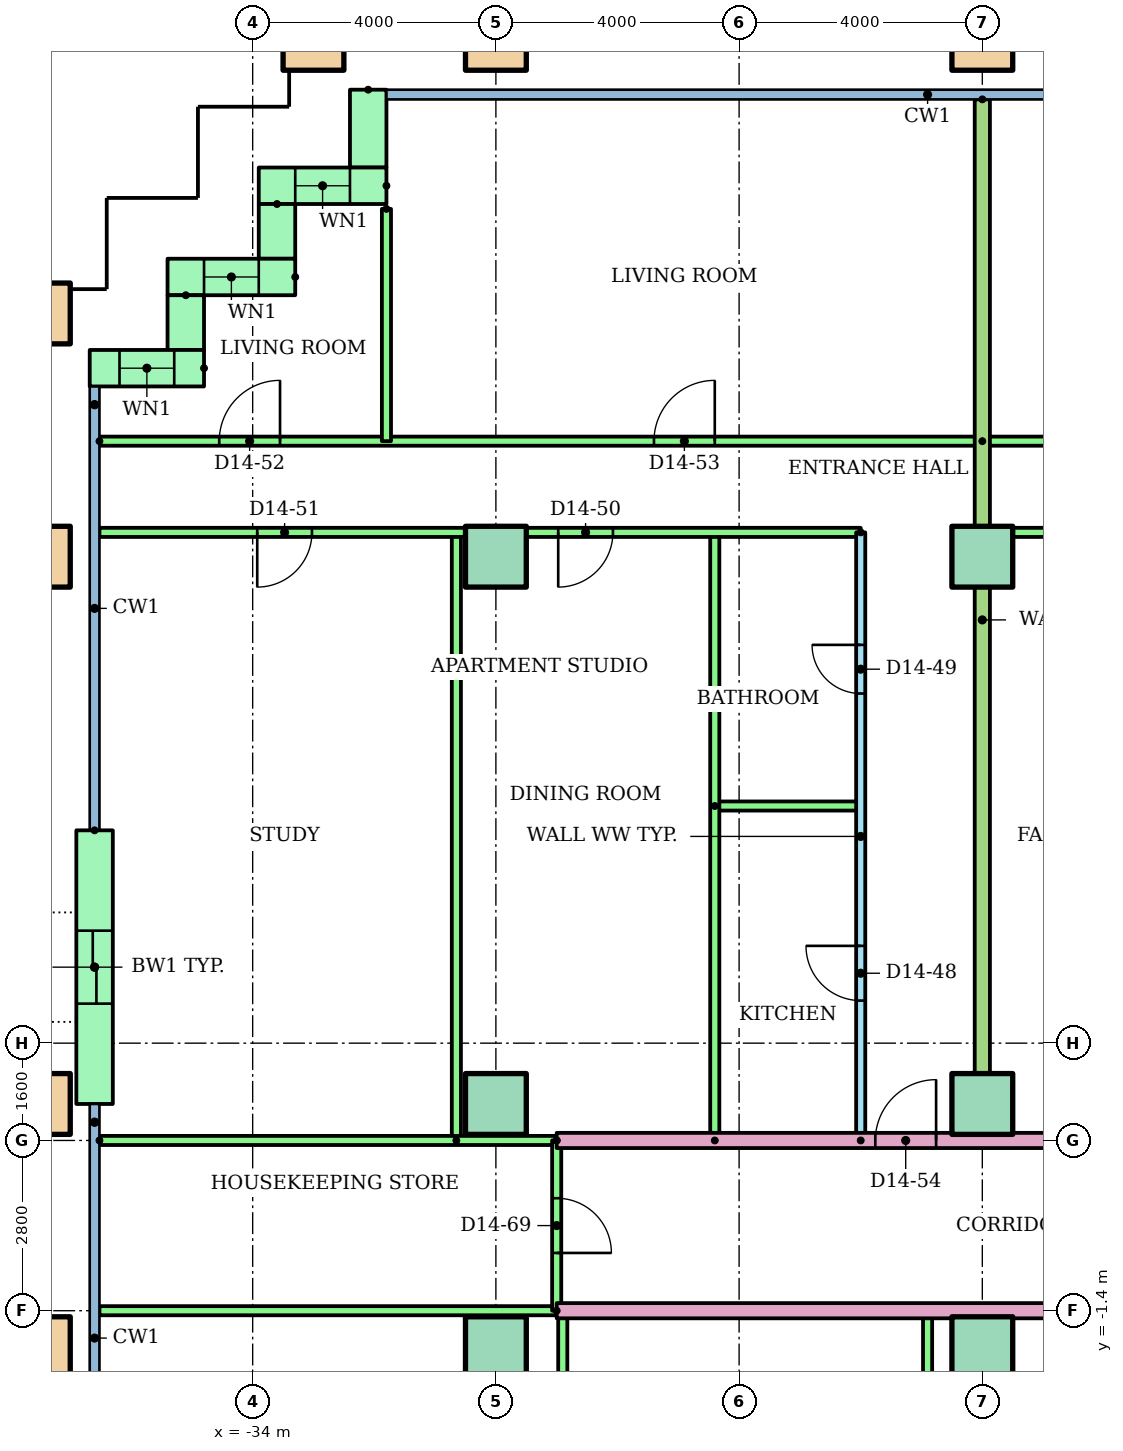
"""IFC4 building model, lengths in metres.
Left out: names, types, materials, properties, quantities, classifications, styles, units other than length and angle.
Written with IfcOpenShell. Run it as: python <this file> out.ifc"""

import sys

from ifc_helpers import new_model, si_unit, direction, frame, frame_2d, origin, origin_2d, place, context, subcontext, project, spatial, rectangle, hollow_rectangle, extrude, element, fill, save


model = new_model("IFC4")
c1 = context("Model", 3, precision=1e-05, world=origin(), true_north=direction((0.0, 1.0)))
c2 = subcontext(c1, "Body", "Model", "MODEL_VIEW")
j1 = project(units=[si_unit("LENGTHUNIT", "METRE"), si_unit("PLANEANGLEUNIT", "RADIAN")], contexts=[c1])
p1 = place(None, origin())
s1 = spatial("IfcSite", under=j1, at=p1, CompositionType="ELEMENT")
p2 = place(p1, origin())
s2 = spatial("IfcBuilding", under=s1, at=p2, CompositionType="ELEMENT")
p3 = place(p2, frame((0.0, 0.0, 54.4)))
s3 = spatial("IfcBuildingStorey", under=s2, at=p3, CompositionType="ELEMENT", Elevation=54.4)
p4 = place(p3, frame((-37.5, -2.0, 0.0)))
e1 = element("IfcColumn", 1, at=p4, inside=s3, PredefinedType="COLUMN", context=c2, shape_type="SweptSolid", body=[
    extrude(hollow_rectangle(XDim=1.0, YDim=1.0, WallThickness=0.05, at=origin_2d()), origin(), (0.0, 0.0, 1.0), 3.2),
])
for number, where in (
    (2, (-30.0, -2.0, 0.0)),
    (3, (-22.0, -2.0, 0.0)),
):
    element("IfcColumn", number, at=place(p3, frame(where)), inside=s3, PredefinedType="COLUMN", context=c2, shape_type="SweptSolid", body=[
        extrude(rectangle(XDim=1.0, YDim=1.0, at=origin_2d()), origin(), (0.0, 0.0, 1.0), 3.2),
    ])
p5 = place(p3, frame((-37.5, 2.0, 0.0)))
e4 = element("IfcColumn", 4, at=p5, inside=s3, PredefinedType="COLUMN", context=c2, shape_type="SweptSolid", body=[
    extrude(hollow_rectangle(XDim=1.0, YDim=1.0, WallThickness=0.05, at=origin_2d()), origin(), (0.0, 0.0, 1.0), 3.2),
])
for number, where in (
    (5, (-30.0, 2.0, 0.0)),
    (6, (-22.0, 2.0, 0.0)),
):
    element("IfcColumn", number, at=place(p3, frame(where)), inside=s3, PredefinedType="COLUMN", context=c2, shape_type="SweptSolid", body=[
        extrude(rectangle(XDim=1.0, YDim=1.0, at=origin_2d()), origin(), (0.0, 0.0, 1.0), 3.2),
    ])
p6 = place(p3, frame((-37.5, 11.0, 0.0)))
e7 = element("IfcColumn", 7, at=p6, inside=s3, PredefinedType="COLUMN", context=c2, shape_type="SweptSolid", body=[
    extrude(hollow_rectangle(XDim=1.0, YDim=1.0, WallThickness=0.05, at=origin_2d()), origin(), (0.0, 0.0, 1.0), 3.2),
])
for number, where in (
    (8, (-30.0, 11.0, 0.0)),
    (9, (-22.0, 11.0, 0.0)),
):
    element("IfcColumn", number, at=place(p3, frame(where)), inside=s3, PredefinedType="COLUMN", context=c2, shape_type="SweptSolid", body=[
        extrude(rectangle(XDim=1.0, YDim=1.0, at=origin_2d()), origin(), (0.0, 0.0, 1.0), 3.2),
    ])
for number, where in (
    (10, (-37.5, 15.0, 0.0)),
    (11, (-33.0, 19.5, 0.0)),
    (12, (-30.0, 19.5, 0.0)),
    (13, (-22.0, 19.5, 0.0)),
):
    element("IfcColumn", number, at=place(p3, frame(where)), inside=s3, PredefinedType="COLUMN", context=c2, shape_type="SweptSolid", body=[
        extrude(hollow_rectangle(XDim=1.0, YDim=1.0, WallThickness=0.05, at=origin_2d()), origin(), (0.0, 0.0, 1.0), 3.2),
    ])
p7 = place(p3, frame((-32.1, 18.68, 0.0), z_axis=(0.0, 0.0, 1.0), x_axis=(0.0, -1.0, 0.0)))
e14 = element("IfcWall", 14, at=p7, inside=s3, PredefinedType="STANDARD", context=c2, shape_type="SweptSolid", body=[
    extrude(rectangle(XDim=1.28, YDim=0.6, at=frame_2d((0.64, 0.0))), origin(), (0.0, 0.0, 1.0), 2.92),
])
p8 = place(p3, frame((-31.8, 17.1, 0.0), z_axis=(0.0, 0.0, 1.0), x_axis=(-1.0, 0.0, 0.0)))
e15 = element("IfcWall", 15, at=p8, inside=s3, PredefinedType="STANDARD", context=c2, shape_type="SweptSolid", body=[
    extrude(rectangle(XDim=2.1, YDim=0.6, at=frame_2d((1.05, 0.0))), origin(), (0.0, 0.0, 1.0), 2.92),
])
p9 = place(p8, frame((0.6, 0.0, 0.9)))
e16 = element("IfcOpeningElement", 16, at=p9, cuts=e15, PredefinedType="OPENING", context=c2, shape_type="SweptSolid", body=[
    extrude(rectangle(XDim=0.9, YDim=1.5, at=frame_2d((0.45, 0.75))), frame((0.0, 0.31, 0.0), z_axis=(0.0, -1.0, 0.0), x_axis=(1.0, 0.0, 0.0)), (0.0, 0.0, 1.0), 0.62),
])
p10 = place(p3, frame((-33.6, 16.8, 0.0), z_axis=(0.0, 0.0, 1.0), x_axis=(0.0, -1.0, 0.0)))
e17 = element("IfcWall", 17, at=p10, inside=s3, PredefinedType="STANDARD", context=c2, shape_type="SweptSolid", body=[
    extrude(rectangle(XDim=0.9, YDim=0.6, at=frame_2d((0.45, 0.0))), origin(), (0.0, 0.0, 1.0), 2.92),
])
p11 = place(p3, frame((-33.3, 15.6, 0.0), z_axis=(0.0, 0.0, 1.0), x_axis=(-1.0, 0.0, 0.0)))
e18 = element("IfcWall", 18, at=p11, inside=s3, PredefinedType="STANDARD", context=c2, shape_type="SweptSolid", body=[
    extrude(rectangle(XDim=2.1, YDim=0.6, at=frame_2d((1.05, 0.0))), origin(), (0.0, 0.0, 1.0), 2.92),
])
p12 = place(p11, frame((0.6, 0.0, 0.9)))
e19 = element("IfcOpeningElement", 19, at=p12, cuts=e18, PredefinedType="OPENING", context=c2, shape_type="SweptSolid", body=[
    extrude(rectangle(XDim=0.9, YDim=1.5, at=frame_2d((0.45, 0.75))), frame((0.0, 0.31, 0.0), z_axis=(0.0, -1.0, 0.0), x_axis=(1.0, 0.0, 0.0)), (0.0, 0.0, 1.0), 0.62),
])
p13 = place(p3, frame((-35.1, 15.3, 0.0), z_axis=(0.0, 0.0, 1.0), x_axis=(0.0, -1.0, 0.0)))
e20 = element("IfcWall", 20, at=p13, inside=s3, PredefinedType="STANDARD", context=c2, shape_type="SweptSolid", body=[
    extrude(rectangle(XDim=0.9, YDim=0.6, at=frame_2d((0.45, 0.0))), origin(), (0.0, 0.0, 1.0), 2.92),
])
p14 = place(p3, frame((-34.8, 14.1, 0.0), z_axis=(0.0, 0.0, 1.0), x_axis=(-1.0, 0.0, 0.0)))
e21 = element("IfcWall", 21, at=p14, inside=s3, PredefinedType="STANDARD", context=c2, shape_type="SweptSolid", body=[
    extrude(rectangle(XDim=1.88, YDim=0.6, at=frame_2d((0.94, 0.0))), origin(), (0.0, 0.0, 1.0), 2.92),
])
p15 = place(p14, frame((0.49, 0.0, 0.9)))
e22 = element("IfcOpeningElement", 22, at=p15, cuts=e21, PredefinedType="OPENING", context=c2, shape_type="SweptSolid", body=[
    extrude(rectangle(XDim=0.9, YDim=1.5, at=frame_2d((0.45, 0.75))), frame((0.0, 0.31, 0.0), z_axis=(0.0, -1.0, 0.0), x_axis=(1.0, 0.0, 0.0)), (0.0, 0.0, 1.0), 0.62),
])
p16 = place(p3, frame((-36.6, 6.5, 0.0), z_axis=(0.0, 0.0, 1.0), x_axis=(0.0, -1.0, 0.0)))
e23 = element("IfcWall", 23, at=p16, inside=s3, PredefinedType="STANDARD", context=c2, shape_type="SweptSolid", body=[
    extrude(rectangle(XDim=4.5, YDim=0.6, at=frame_2d((2.25, 0.0))), origin(), (0.0, 0.0, 1.0), 2.92),
])
p17 = place(p16, frame((1.65, 0.0, 0.0)))
e24 = element("IfcOpeningElement", 24, at=p17, cuts=e23, PredefinedType="OPENING", context=c2, shape_type="SweptSolid", body=[
    extrude(rectangle(XDim=1.2, YDim=2.1, at=frame_2d((0.6, 1.05))), frame((0.0, 0.31, 0.0), z_axis=(0.0, -1.0, 0.0), x_axis=(1.0, 0.0, 0.0)), (0.0, 0.0, 1.0), 0.62),
])
for number, where, z_axis, x_axis in (
    (25, (-22.9, -9.0, 0.0), (0.0, 0.0, 1.0), (0.0, 1.0, 0.0)),
    (26, (-28.9, -9.0, 0.0), (0.0, 0.0, 1.0), (0.0, 1.0, 0.0)),
):
    element("IfcWall", number, at=place(p3, frame(where, z_axis=z_axis, x_axis=x_axis)), inside=s3, PredefinedType="PARTITIONING", context=c2, shape_type="SweptSolid", body=[
        extrude(rectangle(XDim=7.6, YDim=0.15, at=frame_2d((3.8, 0.0))), origin(), (0.0, 0.0, 1.0), 2.4),
    ])
p18 = place(p3, frame((-14.0, -1.4, 0.0), z_axis=(0.0, 0.0, 1.0), x_axis=(-1.0, 0.0, 0.0)))
e27 = element("IfcWall", 27, at=p18, inside=s3, PredefinedType="PARTITIONING", context=c2, shape_type="SweptSolid", body=[
    extrude(rectangle(XDim=15.0, YDim=0.25, at=frame_2d((7.5, 0.0))), origin(), (0.0, 0.0, 1.0), 2.4),
])
p19 = place(p18, frame((0.76, 0.0, 0.0)))
e28 = element("IfcOpeningElement", 28, at=p19, cuts=e27, PredefinedType="OPENING", context=c2, shape_type="SweptSolid", body=[
    extrude(rectangle(XDim=1.0, YDim=2.1, at=frame_2d((0.5, 1.05))), frame((0.0, 0.135, 0.0), z_axis=(0.0, -1.0, 0.0), x_axis=(1.0, 0.0, 0.0)), (0.0, 0.0, 1.0), 0.27),
])
p20 = place(p3, frame((-29.0, -1.4, 0.0), z_axis=(0.0, 0.0, 1.0), x_axis=(-1.0, 0.0, 0.0)))
e29 = element("IfcWall", 29, at=p20, inside=s3, PredefinedType="PARTITIONING", context=c2, shape_type="SweptSolid", body=[
    extrude(rectangle(XDim=7.52, YDim=0.15, at=frame_2d((3.76, 0.0))), origin(), (0.0, 0.0, 1.0), 2.4),
])
p21 = place(p3, frame((-24.0, 1.4, 0.0), z_axis=(0.0, 0.0, 1.0), x_axis=(0.0, 1.0, 0.0)))
e30 = element("IfcWall", 30, at=p21, inside=s3, PredefinedType="PARTITIONING", context=c2, shape_type="SweptSolid", body=[
    extrude(rectangle(XDim=10.0, YDim=0.15, at=frame_2d((5.0, 0.0))), origin(), (0.0, 0.0, 1.0), 2.4),
])
p22 = place(p21, frame((2.3, 0.0, 0.0)))
e31 = element("IfcOpeningElement", 31, at=p22, cuts=e30, PredefinedType="OPENING", context=c2, shape_type="SweptSolid", body=[
    extrude(rectangle(XDim=0.9, YDim=2.1, at=frame_2d((0.45, 1.05))), frame((0.0, 0.085, 0.0), z_axis=(0.0, -1.0, 0.0), x_axis=(1.0, 0.0, 0.0)), (0.0, 0.0, 1.0), 0.17),
])
p23 = place(p21, frame((7.35, 0.0, 0.0)))
e32 = element("IfcOpeningElement", 32, at=p23, cuts=e30, PredefinedType="OPENING", context=c2, shape_type="SweptSolid", body=[
    extrude(rectangle(XDim=0.8, YDim=2.1, at=frame_2d((0.4, 1.05))), frame((0.0, 0.085, 0.0), z_axis=(0.0, -1.0, 0.0), x_axis=(1.0, 0.0, 0.0)), (0.0, 0.0, 1.0), 0.17),
])
p24 = place(p3, frame((-26.4, 6.9, 0.0)))
e33 = element("IfcWall", 33, at=p24, inside=s3, PredefinedType="PARTITIONING", context=c2, shape_type="SweptSolid", body=[
    extrude(rectangle(XDim=2.4, YDim=0.15, at=frame_2d((1.2, 0.0))), origin(), (0.0, 0.0, 1.0), 2.4),
])
for number, where, z_axis, x_axis in (
    (34, (-26.4, 1.4, 0.0), (0.0, 0.0, 1.0), (0.0, 1.0, 0.0)),
    (35, (-30.65, 1.4, 0.0), (0.0, 0.0, 1.0), (0.0, 1.0, 0.0)),
):
    element("IfcWall", number, at=place(p3, frame(where, z_axis=z_axis, x_axis=x_axis)), inside=s3, PredefinedType="PARTITIONING", context=c2, shape_type="SweptSolid", body=[
        extrude(rectangle(XDim=10.0, YDim=0.15, at=frame_2d((5.0, 0.0))), origin(), (0.0, 0.0, 1.0), 2.4),
    ])
p25 = place(p3, frame((-24.0, 11.4, 0.0), z_axis=(0.0, 0.0, 1.0), x_axis=(-1.0, 0.0, 0.0)))
e36 = element("IfcWall", 36, at=p25, inside=s3, PredefinedType="PARTITIONING", context=c2, shape_type="SweptSolid", body=[
    extrude(rectangle(XDim=12.52, YDim=0.15, at=frame_2d((6.26, 0.0))), origin(), (0.0, 0.0, 1.0), 2.4),
])
p26 = place(p25, frame((4.075, 0.0, 0.0)))
e37 = element("IfcOpeningElement", 37, at=p26, cuts=e36, PredefinedType="OPENING", context=c2, shape_type="SweptSolid", body=[
    extrude(rectangle(XDim=0.9, YDim=2.1, at=frame_2d((0.45, 1.05))), frame((0.0, 0.085, 0.0), z_axis=(0.0, -1.0, 0.0), x_axis=(1.0, 0.0, 0.0)), (0.0, 0.0, 1.0), 0.17),
])
p27 = place(p25, frame((9.025, 0.0, 0.0)))
e38 = element("IfcOpeningElement", 38, at=p27, cuts=e36, PredefinedType="OPENING", context=c2, shape_type="SweptSolid", body=[
    extrude(rectangle(XDim=0.9, YDim=2.1, at=frame_2d((0.45, 1.05))), frame((0.0, 0.085, 0.0), z_axis=(0.0, -1.0, 0.0), x_axis=(1.0, 0.0, 0.0)), (0.0, 0.0, 1.0), 0.17),
])
p28 = place(p3, frame((-36.52, 12.9, 0.0)))
e39 = element("IfcWall", 39, at=p28, inside=s3, PredefinedType="PARTITIONING", context=c2, shape_type="SweptSolid", body=[
    extrude(rectangle(XDim=14.52, YDim=0.15, at=frame_2d((7.26, 0.0))), origin(), (0.0, 0.0, 1.0), 2.4),
])
p29 = place(p28, frame((1.97, 0.0, 0.0)))
e40 = element("IfcOpeningElement", 40, at=p29, cuts=e39, PredefinedType="OPENING", context=c2, shape_type="SweptSolid", body=[
    extrude(rectangle(XDim=1.0, YDim=2.1, at=frame_2d((0.5, 1.05))), frame((0.0, 0.085, 0.0), z_axis=(0.0, -1.0, 0.0), x_axis=(1.0, 0.0, 0.0)), (0.0, 0.0, 1.0), 0.17),
])
p30 = place(p28, frame((9.12, 0.0, 0.0)))
e41 = element("IfcOpeningElement", 41, at=p30, cuts=e39, PredefinedType="OPENING", context=c2, shape_type="SweptSolid", body=[
    extrude(rectangle(XDim=1.0, YDim=2.1, at=frame_2d((0.5, 1.05))), frame((0.0, 0.085, 0.0), z_axis=(0.0, -1.0, 0.0), x_axis=(1.0, 0.0, 0.0)), (0.0, 0.0, 1.0), 0.17),
])
p31 = place(p3, frame((-31.8, 16.72, 0.0), z_axis=(0.0, 0.0, 1.0), x_axis=(0.0, -1.0, 0.0)))
e42 = element("IfcWall", 42, at=p31, inside=s3, PredefinedType="PARTITIONING", context=c2, shape_type="SweptSolid", body=[
    extrude(rectangle(XDim=3.82, YDim=0.15, at=frame_2d((1.91, 0.0))), origin(), (0.0, 0.0, 1.0), 2.4),
])
p32 = place(p3, frame((-16.0, 11.4, 0.0), z_axis=(0.0, 0.0, 1.0), x_axis=(-1.0, 0.0, 0.0)))
e43 = element("IfcWall", 43, at=p32, inside=s3, PredefinedType="PARTITIONING", context=c2, shape_type="SweptSolid", body=[
    extrude(rectangle(XDim=6.0, YDim=0.15, at=frame_2d((3.0, 0.0))), origin(), (0.0, 0.0, 1.0), 2.4),
])
p33 = place(p32, frame((3.75, 0.0, 0.0)))
e44 = element("IfcOpeningElement", 44, at=p33, cuts=e43, PredefinedType="OPENING", context=c2, shape_type="SweptSolid", body=[
    extrude(rectangle(XDim=0.9, YDim=2.1, at=frame_2d((0.45, 1.05))), frame((0.0, 0.085, 0.0), z_axis=(0.0, -1.0, 0.0), x_axis=(1.0, 0.0, 0.0)), (0.0, 0.0, 1.0), 0.17),
])
p34 = place(p3, frame((-22.0, 12.9, 0.0)))
e45 = element("IfcWall", 45, at=p34, inside=s3, PredefinedType="PARTITIONING", context=c2, shape_type="SweptSolid", body=[
    extrude(rectangle(XDim=8.0, YDim=0.15, at=frame_2d((4.0, 0.0))), origin(), (0.0, 0.0, 1.0), 2.4),
])
p35 = place(p34, frame((3.5, 0.0, 0.0)))
e46 = element("IfcOpeningElement", 46, at=p35, cuts=e45, PredefinedType="OPENING", context=c2, shape_type="SweptSolid", body=[
    extrude(rectangle(XDim=1.0, YDim=2.1, at=frame_2d((0.5, 1.05))), frame((0.0, 0.085, 0.0), z_axis=(0.0, -1.0, 0.0), x_axis=(1.0, 0.0, 0.0)), (0.0, 0.0, 1.0), 0.17),
])
p36 = place(p3, frame((-22.0, 18.521, 0.0), z_axis=(0.0, 0.0, 1.0), x_axis=(0.0, -1.0, 0.0)))
e47 = element("IfcWall", 47, at=p36, inside=s3, PredefinedType="PARTITIONING", context=c2, shape_type="SweptSolid", body=[
    extrude(rectangle(XDim=17.121, YDim=0.25, at=frame_2d((8.561, 0.0))), origin(), (0.0, 0.0, 1.0), 2.4),
])
p37 = place(p3, frame((-29.0, 1.4, 0.0)))
e48 = element("IfcWall", 48, at=p37, inside=s3, PredefinedType="PARTITIONING", context=c2, shape_type="SweptSolid", body=[
    extrude(rectangle(XDim=15.0, YDim=0.25, at=frame_2d((7.5, 0.0))), origin(), (0.0, 0.0, 1.0), 2.4),
])
p38 = place(p37, frame((5.24, 0.0, 0.0)))
e49 = element("IfcOpeningElement", 49, at=p38, cuts=e48, PredefinedType="OPENING", context=c2, shape_type="SweptSolid", body=[
    extrude(rectangle(XDim=1.0, YDim=2.1, at=frame_2d((0.5, 1.05))), frame((0.0, 0.135, 0.0), z_axis=(0.0, -1.0, 0.0), x_axis=(1.0, 0.0, 0.0)), (0.0, 0.0, 1.0), 0.27),
])
p39 = place(p37, frame((13.5, 0.0, 0.0)))
e50 = element("IfcOpeningElement", 50, at=p39, cuts=e48, PredefinedType="OPENING", context=c2, shape_type="SweptSolid", body=[
    extrude(rectangle(XDim=1.0, YDim=2.1, at=frame_2d((0.5, 1.05))), frame((0.0, 0.135, 0.0), z_axis=(0.0, -1.0, 0.0), x_axis=(1.0, 0.0, 0.0)), (0.0, 0.0, 1.0), 0.27),
])
p40 = place(p3, frame((-36.52, 1.4, 0.0)))
e51 = element("IfcWall", 51, at=p40, inside=s3, PredefinedType="PARTITIONING", context=c2, shape_type="SweptSolid", body=[
    extrude(rectangle(XDim=7.52, YDim=0.15, at=frame_2d((3.76, 0.0))), origin(), (0.0, 0.0, 1.0), 2.4),
])
p41 = place(p3, frame((-29.0, 1.4, 0.0), z_axis=(0.0, 0.0, 1.0), x_axis=(0.0, -1.0, 0.0)))
e52 = element("IfcWall", 52, at=p41, inside=s3, PredefinedType="PARTITIONING", context=c2, shape_type="SweptSolid", body=[
    extrude(rectangle(XDim=2.8, YDim=0.15, at=frame_2d((1.4, 0.0))), origin(), (0.0, 0.0, 1.0), 2.4),
])
p42 = place(p41, frame((0.95, 0.0, 0.0)))
e53 = element("IfcOpeningElement", 53, at=p42, cuts=e52, PredefinedType="OPENING", context=c2, shape_type="SweptSolid", body=[
    extrude(rectangle(XDim=0.9, YDim=2.1, at=frame_2d((0.45, 1.05))), frame((0.0, 0.085, 0.0), z_axis=(0.0, -1.0, 0.0), x_axis=(1.0, 0.0, 0.0)), (0.0, 0.0, 1.0), 0.17),
])
p43 = place(p9, origin())
e54 = element("IfcWindow", 54, at=p43, inside=s3, PartitioningType="SINGLE_PANEL", PredefinedType="WINDOW", context=c2, shape_type="SweptSolid", body=[
    extrude(rectangle(XDim=0.9, YDim=1.5, at=frame_2d((0.45, 0.75))), frame((0.0, 0.03, 0.0), z_axis=(0.0, -1.0, 0.0), x_axis=(1.0, 0.0, 0.0)), (0.0, 0.0, 1.0), 0.06),
])
fill(e16, e54)
p44 = place(p12, origin())
e55 = element("IfcWindow", 55, at=p44, inside=s3, PartitioningType="SINGLE_PANEL", PredefinedType="WINDOW", context=c2, shape_type="SweptSolid", body=[
    extrude(rectangle(XDim=0.9, YDim=1.5, at=frame_2d((0.45, 0.75))), frame((0.0, 0.03, 0.0), z_axis=(0.0, -1.0, 0.0), x_axis=(1.0, 0.0, 0.0)), (0.0, 0.0, 1.0), 0.06),
])
fill(e19, e55)
p45 = place(p15, origin())
e56 = element("IfcWindow", 56, at=p45, inside=s3, PartitioningType="SINGLE_PANEL", PredefinedType="WINDOW", context=c2, shape_type="SweptSolid", body=[
    extrude(rectangle(XDim=0.9, YDim=1.5, at=frame_2d((0.45, 0.75))), frame((0.0, 0.03, 0.0), z_axis=(0.0, -1.0, 0.0), x_axis=(1.0, 0.0, 0.0)), (0.0, 0.0, 1.0), 0.06),
])
fill(e22, e56)
p46 = place(p22, origin())
e57 = element("IfcDoor", 57, at=p46, inside=s3, OperationType="SINGLE_SWING_RIGHT", PredefinedType="DOOR", context=c2, shape_type="SweptSolid", body=[
    extrude(rectangle(XDim=0.9, YDim=2.1, at=frame_2d((0.45, 1.05))), frame((0.0, 0.025, 0.0), z_axis=(0.0, -1.0, 0.0), x_axis=(1.0, 0.0, 0.0)), (0.0, 0.0, 1.0), 0.05),
])
fill(e31, e57)
p47 = place(p23, origin())
e58 = element("IfcDoor", 58, at=p47, inside=s3, OperationType="SINGLE_SWING_RIGHT", PredefinedType="DOOR", context=c2, shape_type="SweptSolid", body=[
    extrude(rectangle(XDim=0.8, YDim=2.1, at=frame_2d((0.4, 1.05))), frame((0.0, 0.025, 0.0), z_axis=(0.0, -1.0, 0.0), x_axis=(1.0, 0.0, 0.0)), (0.0, 0.0, 1.0), 0.05),
])
fill(e32, e58)
p48 = place(p26, origin())
e59 = element("IfcDoor", 59, at=p48, inside=s3, OperationType="SINGLE_SWING_RIGHT", PredefinedType="DOOR", context=c2, shape_type="SweptSolid", body=[
    extrude(rectangle(XDim=0.9, YDim=2.1, at=frame_2d((0.45, 1.05))), frame((0.0, 0.025, 0.0), z_axis=(0.0, -1.0, 0.0), x_axis=(1.0, 0.0, 0.0)), (0.0, 0.0, 1.0), 0.05),
])
fill(e37, e59)
p49 = place(p27, origin())
e60 = element("IfcDoor", 60, at=p49, inside=s3, OperationType="SINGLE_SWING_RIGHT", PredefinedType="DOOR", context=c2, shape_type="SweptSolid", body=[
    extrude(rectangle(XDim=0.9, YDim=2.1, at=frame_2d((0.45, 1.05))), frame((0.0, 0.025, 0.0), z_axis=(0.0, -1.0, 0.0), x_axis=(1.0, 0.0, 0.0)), (0.0, 0.0, 1.0), 0.05),
])
fill(e38, e60)
p50 = place(p29, origin())
e61 = element("IfcDoor", 61, at=p50, inside=s3, OperationType="SINGLE_SWING_RIGHT", PredefinedType="DOOR", context=c2, shape_type="SweptSolid", body=[
    extrude(rectangle(XDim=1.0, YDim=2.1, at=frame_2d((0.5, 1.05))), frame((0.0, 0.025, 0.0), z_axis=(0.0, -1.0, 0.0), x_axis=(1.0, 0.0, 0.0)), (0.0, 0.0, 1.0), 0.05),
])
fill(e40, e61)
p51 = place(p30, origin())
e62 = element("IfcDoor", 62, at=p51, inside=s3, OperationType="SINGLE_SWING_RIGHT", PredefinedType="DOOR", context=c2, shape_type="SweptSolid", body=[
    extrude(rectangle(XDim=1.0, YDim=2.1, at=frame_2d((0.5, 1.05))), frame((0.0, 0.025, 0.0), z_axis=(0.0, -1.0, 0.0), x_axis=(1.0, 0.0, 0.0)), (0.0, 0.0, 1.0), 0.05),
])
fill(e41, e62)
p52 = place(p38, origin())
e63 = element("IfcDoor", 63, at=p52, inside=s3, OperationType="SINGLE_SWING_RIGHT", PredefinedType="DOOR", context=c2, shape_type="SweptSolid", body=[
    extrude(rectangle(XDim=1.0, YDim=2.1, at=frame_2d((0.5, 1.05))), frame((0.0, 0.025, 0.0), z_axis=(0.0, -1.0, 0.0), x_axis=(1.0, 0.0, 0.0)), (0.0, 0.0, 1.0), 0.05),
])
fill(e49, e63)
p53 = place(p42, origin())
e64 = element("IfcDoor", 64, at=p53, inside=s3, OperationType="SINGLE_SWING_RIGHT", PredefinedType="DOOR", context=c2, shape_type="SweptSolid", body=[
    extrude(rectangle(XDim=0.9, YDim=2.1, at=frame_2d((0.45, 1.05))), frame((0.0, 0.025, 0.0), z_axis=(0.0, -1.0, 0.0), x_axis=(1.0, 0.0, 0.0)), (0.0, 0.0, 1.0), 0.05),
])
fill(e53, e64)
p54 = place(p17, origin())
e65 = element("IfcDoor", 65, at=p54, inside=s3, OperationType="SLIDING_TO_LEFT", PredefinedType="DOOR", context=c2, shape_type="SweptSolid", body=[
    extrude(rectangle(XDim=1.2, YDim=2.1, at=frame_2d((0.6, 1.05))), frame((0.0, 0.025, 0.0), z_axis=(0.0, -1.0, 0.0), x_axis=(1.0, 0.0, 0.0)), (0.0, 0.0, 1.0), 0.05),
])
fill(e24, e65)
save(model, sys.argv[1])
